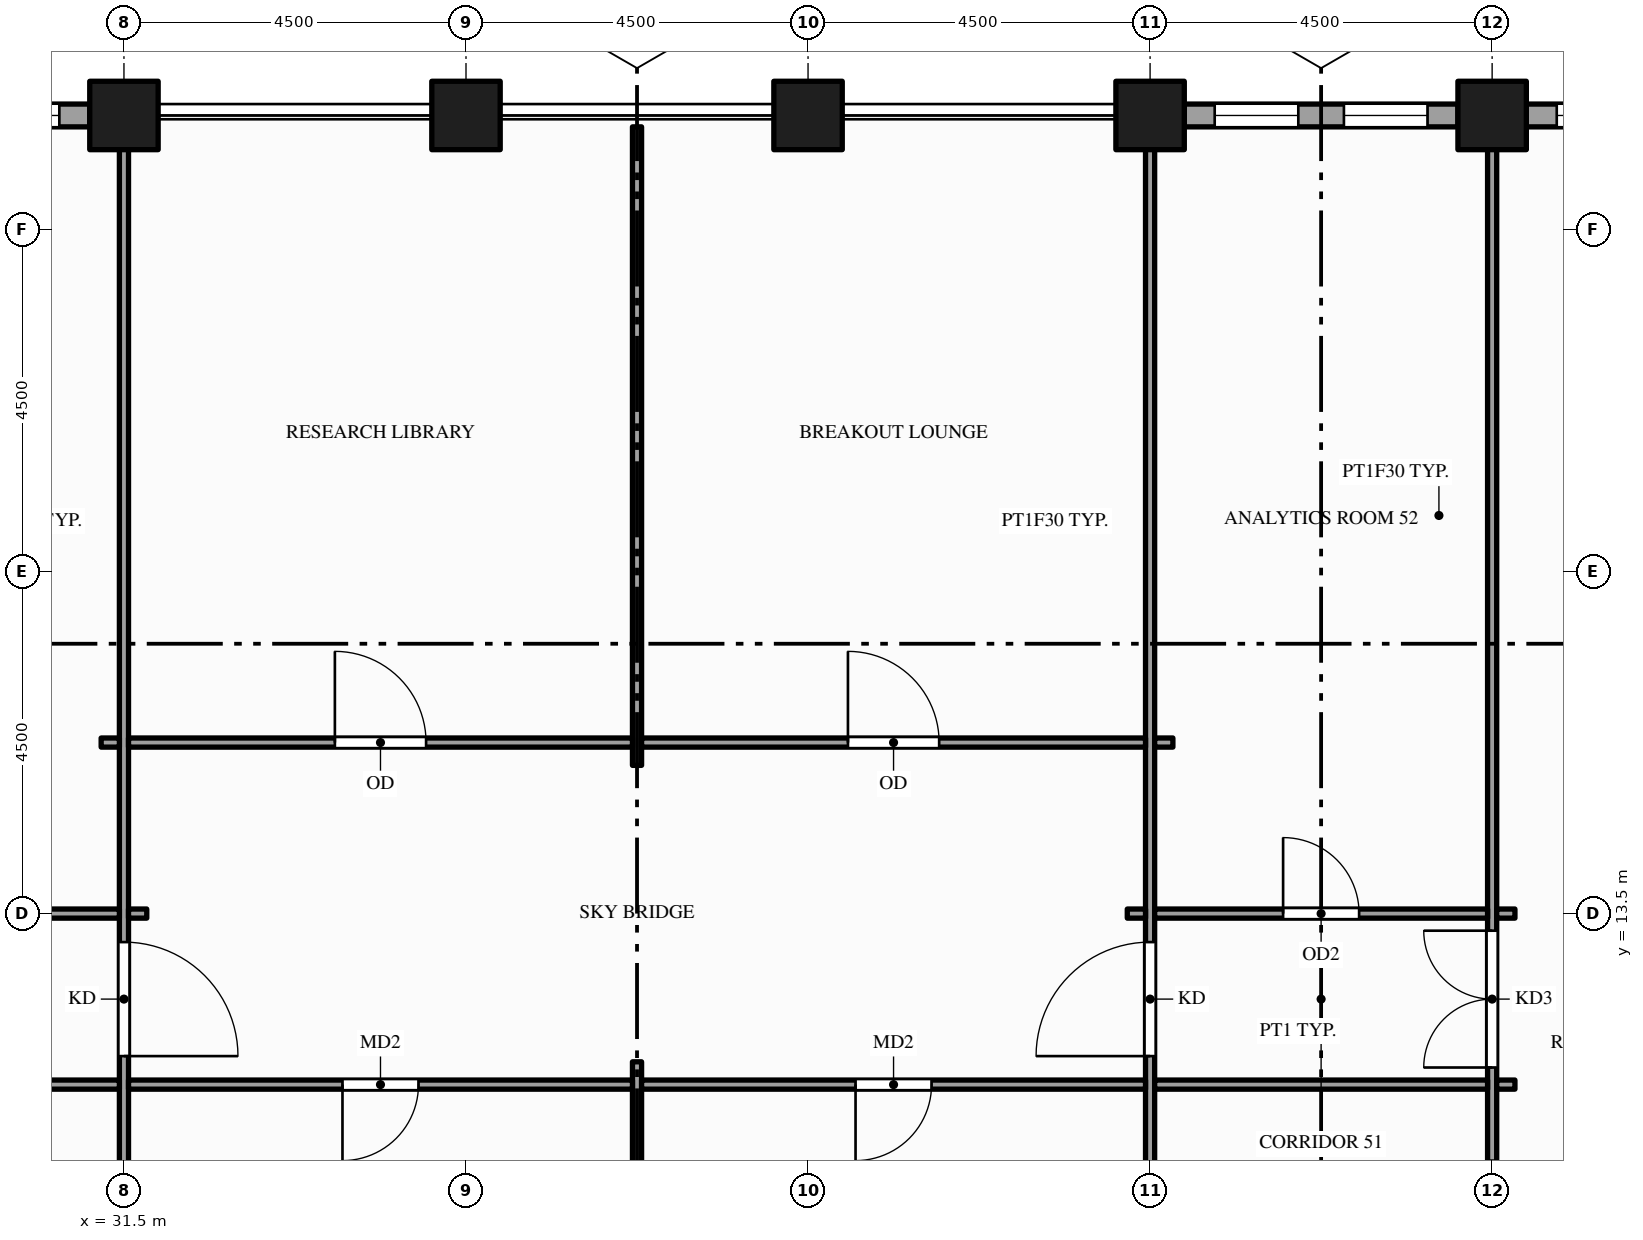
"""IFC4 building model, lengths in metres.
Left out: names, types, materials, properties, quantities, classifications, styles, units other than length and angle.
Written with IfcOpenShell. Run it as: python <this file> out.ifc"""

import sys

from ifc_helpers import new_model, si_unit, direction, frame, frame_2d, origin, origin_2d, place, context, subcontext, project, spatial, rectangle, hollow_rectangle, extrude, element, fill, save


model = new_model("IFC4")
c1 = context("Model", 3, precision=1e-05, world=origin(), true_north=direction((0.0, 1.0)))
c2 = subcontext(c1, "Body", "Model", "MODEL_VIEW")
j1 = project(units=[si_unit("LENGTHUNIT", "METRE"), si_unit("PLANEANGLEUNIT", "RADIAN")], contexts=[c1])
p1 = place(None, origin())
s1 = spatial("IfcSite", under=j1, at=p1, CompositionType="ELEMENT")
p2 = place(p1, origin())
s2 = spatial("IfcBuilding", under=s1, at=p2, CompositionType="ELEMENT")
p3 = place(p2, frame((0.0, 0.0, 155.0)))
s3 = spatial("IfcBuildingStorey", under=s2, at=p3, CompositionType="ELEMENT", Elevation=155.0)
for number, where, z_axis, x_axis in (
    (1, (31.5, 24.0, -0.15), (0.0, 0.0, 1.0), (1.0, 0.0, 0.0)),
    (2, (36.0, 24.0, -0.15), (0.0, 0.0, 1.0), (1.0, 0.0, 0.0)),
    (3, (40.5, 24.0, -0.15), (0.0, 0.0, 1.0), (1.0, 0.0, 0.0)),
    (4, (45.0, 24.0, -0.15), (0.0, 0.0, 1.0), (1.0, 0.0, 0.0)),
    (5, (49.5, 24.0, -0.15), (0.0, 0.0, 1.0), (1.0, 0.0, 0.0)),
):
    element("IfcColumn", number, at=place(p3, frame(where, z_axis=z_axis, x_axis=x_axis)), inside=s3, PredefinedType="COLUMN", context=c2, shape_type="SweptSolid", body=[
        extrude(hollow_rectangle(XDim=0.9, YDim=0.9, WallThickness=0.045, at=origin_2d()), origin(), (0.0, 0.0, 1.0), 4.0),
    ])
p4 = place(p3, frame((53.55, 24.0, 0.0), z_axis=(0.0, 0.0, 1.0), x_axis=(-1.0, 0.0, 0.0)))
e6 = element("IfcWall", 6, at=p4, inside=s3, PredefinedType="STANDARD", context=c2, shape_type="SweptSolid", body=[
    extrude(rectangle(XDim=3.6, YDim=0.3, at=frame_2d((1.8, 0.0))), origin(), (0.0, 0.0, 1.0), 2.87),
])
p5 = place(p4, frame((0.4, 0.0, 0.9)))
e7 = element("IfcOpeningElement", 7, at=p5, cuts=e6, PredefinedType="OPENING", context=c2, shape_type="SweptSolid", body=[
    extrude(rectangle(XDim=1.1, YDim=1.75, at=frame_2d((0.55, 0.875))), frame((0.0, 0.16, 0.0), z_axis=(0.0, -1.0, 0.0), x_axis=(1.0, 0.0, 0.0)), (0.0, 0.0, 1.0), 0.32),
])
p6 = place(p4, frame((2.1, 0.0, 0.9)))
e8 = element("IfcOpeningElement", 8, at=p6, cuts=e6, PredefinedType="OPENING", context=c2, shape_type="SweptSolid", body=[
    extrude(rectangle(XDim=1.1, YDim=1.75, at=frame_2d((0.55, 0.875))), frame((0.0, 0.16, 0.0), z_axis=(0.0, -1.0, 0.0), x_axis=(1.0, 0.0, 0.0)), (0.0, 0.0, 1.0), 0.32),
])
p7 = place(p3, frame((49.05, 24.0, 0.0), z_axis=(0.0, 0.0, 1.0), x_axis=(-1.0, 0.0, 0.0)))
e9 = element("IfcWall", 9, at=p7, inside=s3, PredefinedType="STANDARD", context=c2, shape_type="SweptSolid", body=[
    extrude(rectangle(XDim=3.6, YDim=0.3, at=frame_2d((1.8, 0.0))), origin(), (0.0, 0.0, 1.0), 2.87),
])
p8 = place(p7, frame((0.4, 0.0, 0.9)))
e10 = element("IfcOpeningElement", 10, at=p8, cuts=e9, PredefinedType="OPENING", context=c2, shape_type="SweptSolid", body=[
    extrude(rectangle(XDim=1.1, YDim=1.75, at=frame_2d((0.55, 0.875))), frame((0.0, 0.16, 0.0), z_axis=(0.0, -1.0, 0.0), x_axis=(1.0, 0.0, 0.0)), (0.0, 0.0, 1.0), 0.32),
])
p9 = place(p7, frame((2.1, 0.0, 0.9)))
e11 = element("IfcOpeningElement", 11, at=p9, cuts=e9, PredefinedType="OPENING", context=c2, shape_type="SweptSolid", body=[
    extrude(rectangle(XDim=1.1, YDim=1.75, at=frame_2d((0.55, 0.875))), frame((0.0, 0.16, 0.0), z_axis=(0.0, -1.0, 0.0), x_axis=(1.0, 0.0, 0.0)), (0.0, 0.0, 1.0), 0.32),
])
p10 = place(p3, frame((31.05, 24.0, 0.0), z_axis=(0.0, 0.0, 1.0), x_axis=(-1.0, 0.0, 0.0)))
e12 = element("IfcWall", 12, at=p10, inside=s3, PredefinedType="STANDARD", context=c2, shape_type="SweptSolid", body=[
    extrude(rectangle(XDim=5.1, YDim=0.3, at=frame_2d((2.55, 0.0))), origin(), (0.0, 0.0, 1.0), 2.87),
])
p11 = place(p10, frame((0.4, 0.0, 0.9)))
e13 = element("IfcOpeningElement", 13, at=p11, cuts=e12, PredefinedType="OPENING", context=c2, shape_type="SweptSolid", body=[
    extrude(rectangle(XDim=1.1, YDim=1.75, at=frame_2d((0.55, 0.875))), frame((0.0, 0.16, 0.0), z_axis=(0.0, -1.0, 0.0), x_axis=(1.0, 0.0, 0.0)), (0.0, 0.0, 1.0), 0.32),
])
p12 = place(p10, frame((2.1, 0.0, 0.9)))
e14 = element("IfcOpeningElement", 14, at=p12, cuts=e12, PredefinedType="OPENING", context=c2, shape_type="SweptSolid", body=[
    extrude(rectangle(XDim=1.65, YDim=1.75, at=frame_2d((0.825, 0.875))), frame((0.0, 0.16, 0.0), z_axis=(0.0, -1.0, 0.0), x_axis=(1.0, 0.0, 0.0)), (0.0, 0.0, 1.0), 0.32),
])
p13 = place(p3, frame((31.5, 1.65, 0.0), z_axis=(0.0, 0.0, 1.0), x_axis=(0.0, 1.0, 0.0)))
e15 = element("IfcWall", 15, at=p13, inside=s3, PredefinedType="PARTITIONING", context=c2, shape_type="SweptSolid", body=[
    extrude(rectangle(XDim=22.2, YDim=0.12, at=frame_2d((11.1, 0.0))), origin(), (0.0, 0.0, 1.0), 2.87),
])
p14 = place(p13, frame((9.975, 0.0, 0.0)))
e16 = element("IfcOpeningElement", 16, at=p14, cuts=e15, PredefinedType="OPENING", context=c2, shape_type="SweptSolid", body=[
    extrude(rectangle(XDim=1.5, YDim=2.1, at=frame_2d((0.75, 1.05))), frame((0.0, 0.07, 0.0), z_axis=(0.0, -1.0, 0.0), x_axis=(1.0, 0.0, 0.0)), (0.0, 0.0, 1.0), 0.14),
])
p15 = place(p3, frame((38.25, 1.65, 0.0), z_axis=(0.0, 0.0, 1.0), x_axis=(0.0, 1.0, 0.0)))
e17 = element("IfcWall", 17, at=p15, inside=s3, PredefinedType="PARTITIONING", context=c2, shape_type="SweptSolid", body=[
    extrude(rectangle(XDim=9.9, YDim=0.12, at=frame_2d((4.95, 0.0))), origin(), (0.0, 0.0, 1.0), 2.87),
])
p16 = place(p3, frame((38.25, 15.45, 0.0), z_axis=(0.0, 0.0, 1.0), x_axis=(0.0, 1.0, 0.0)))
e18 = element("IfcWall", 18, at=p16, inside=s3, PredefinedType="PARTITIONING", context=c2, shape_type="SweptSolid", body=[
    extrude(rectangle(XDim=8.4, YDim=0.12, at=frame_2d((4.2, 0.0))), origin(), (0.0, 0.0, 1.0), 2.87),
])
p17 = place(p3, frame((45.0, 1.65, 0.0), z_axis=(0.0, 0.0, 1.0), x_axis=(0.0, 1.0, 0.0)))
e19 = element("IfcWall", 19, at=p17, inside=s3, PredefinedType="PARTITIONING", context=c2, shape_type="SweptSolid", body=[
    extrude(rectangle(XDim=22.2, YDim=0.12, at=frame_2d((11.1, 0.0))), origin(), (0.0, 0.0, 1.0), 2.87),
])
p18 = place(p17, frame((9.975, 0.0, 0.0)))
e20 = element("IfcOpeningElement", 20, at=p18, cuts=e19, PredefinedType="OPENING", context=c2, shape_type="SweptSolid", body=[
    extrude(rectangle(XDim=1.5, YDim=2.1, at=frame_2d((0.75, 1.05))), frame((0.0, 0.07, 0.0), z_axis=(0.0, -1.0, 0.0), x_axis=(1.0, 0.0, 0.0)), (0.0, 0.0, 1.0), 0.14),
])
p19 = place(p3, frame((49.5, 1.65, 0.0), z_axis=(0.0, 0.0, 1.0), x_axis=(0.0, 1.0, 0.0)))
e21 = element("IfcWall", 21, at=p19, inside=s3, PredefinedType="PARTITIONING", context=c2, shape_type="SweptSolid", body=[
    extrude(rectangle(XDim=22.2, YDim=0.12, at=frame_2d((11.1, 0.0))), origin(), (0.0, 0.0, 1.0), 2.87),
])
p20 = place(p19, frame((9.825, 0.0, 0.0)))
e22 = element("IfcOpeningElement", 22, at=p20, cuts=e21, PredefinedType="OPENING", context=c2, shape_type="SweptSolid", body=[
    extrude(rectangle(XDim=1.8, YDim=2.1, at=frame_2d((0.9, 1.05))), frame((0.0, 0.07, 0.0), z_axis=(0.0, -1.0, 0.0), x_axis=(1.0, 0.0, 0.0)), (0.0, 0.0, 1.0), 0.14),
])
p21 = place(p19, frame((0.85, 0.0, 0.0)))
e23 = element("IfcOpeningElement", 23, at=p21, cuts=e21, PredefinedType="OPENING", context=c2, shape_type="SweptSolid", body=[
    extrude(rectangle(XDim=0.9, YDim=2.1, at=frame_2d((0.45, 1.05))), frame((0.0, 0.07, 0.0), z_axis=(0.0, -1.0, 0.0), x_axis=(1.0, 0.0, 0.0)), (0.0, 0.0, 1.0), 0.14),
])
p22 = place(p19, frame((4.275, 0.0, 0.0)))
e24 = element("IfcOpeningElement", 24, at=p22, cuts=e21, PredefinedType="OPENING", context=c2, shape_type="SweptSolid", body=[
    extrude(rectangle(XDim=0.9, YDim=2.1, at=frame_2d((0.45, 1.05))), frame((0.0, 0.07, 0.0), z_axis=(0.0, -1.0, 0.0), x_axis=(1.0, 0.0, 0.0)), (0.0, 0.0, 1.0), 0.14),
])
p23 = place(p19, frame((7.6, 0.0, 0.0)))
e25 = element("IfcOpeningElement", 25, at=p23, cuts=e21, PredefinedType="OPENING", context=c2, shape_type="SweptSolid", body=[
    extrude(rectangle(XDim=1.0, YDim=2.1, at=frame_2d((0.5, 1.05))), frame((0.0, 0.07, 0.0), z_axis=(0.0, -1.0, 0.0), x_axis=(1.0, 0.0, 0.0)), (0.0, 0.0, 1.0), 0.14),
])
p24 = place(p3, frame((27.06, 11.25, 0.0), z_axis=(0.0, 0.0, 1.0), x_axis=(1.0, 0.0, 0.0)))
e26 = element("IfcWall", 26, at=p24, inside=s3, PredefinedType="PARTITIONING", context=c2, shape_type="SweptSolid", body=[
    extrude(rectangle(XDim=4.38, YDim=0.12, at=frame_2d((2.19, 0.0))), origin(), (0.0, 0.0, 1.0), 2.87),
])
p25 = place(p24, frame((1.74, 0.0, 0.0)))
e27 = element("IfcOpeningElement", 27, at=p25, cuts=e26, PredefinedType="OPENING", context=c2, shape_type="SweptSolid", body=[
    extrude(rectangle(XDim=0.9, YDim=2.1, at=frame_2d((0.45, 1.05))), frame((0.0, 0.07, 0.0), z_axis=(0.0, -1.0, 0.0), x_axis=(1.0, 0.0, 0.0)), (0.0, 0.0, 1.0), 0.14),
])
p26 = place(p3, frame((31.56, 11.25, 0.0), z_axis=(0.0, 0.0, 1.0), x_axis=(1.0, 0.0, 0.0)))
e28 = element("IfcWall", 28, at=p26, inside=s3, PredefinedType="PARTITIONING", context=c2, shape_type="SweptSolid", body=[
    extrude(rectangle(XDim=6.63, YDim=0.12, at=frame_2d((3.315, 0.0))), origin(), (0.0, 0.0, 1.0), 2.87),
])
p27 = place(p26, frame((2.815, 0.0, 0.0)))
e29 = element("IfcOpeningElement", 29, at=p27, cuts=e28, PredefinedType="OPENING", context=c2, shape_type="SweptSolid", body=[
    extrude(rectangle(XDim=1.0, YDim=2.1, at=frame_2d((0.5, 1.05))), frame((0.0, 0.07, 0.0), z_axis=(0.0, -1.0, 0.0), x_axis=(1.0, 0.0, 0.0)), (0.0, 0.0, 1.0), 0.14),
])
p28 = place(p3, frame((38.31, 11.25, 0.0), z_axis=(0.0, 0.0, 1.0), x_axis=(1.0, 0.0, 0.0)))
e30 = element("IfcWall", 30, at=p28, inside=s3, PredefinedType="PARTITIONING", context=c2, shape_type="SweptSolid", body=[
    extrude(rectangle(XDim=6.63, YDim=0.12, at=frame_2d((3.315, 0.0))), origin(), (0.0, 0.0, 1.0), 2.87),
])
p29 = place(p28, frame((2.815, 0.0, 0.0)))
e31 = element("IfcOpeningElement", 31, at=p29, cuts=e30, PredefinedType="OPENING", context=c2, shape_type="SweptSolid", body=[
    extrude(rectangle(XDim=1.0, YDim=2.1, at=frame_2d((0.5, 1.05))), frame((0.0, 0.07, 0.0), z_axis=(0.0, -1.0, 0.0), x_axis=(1.0, 0.0, 0.0)), (0.0, 0.0, 1.0), 0.14),
])
p30 = place(p3, frame((45.06, 11.25, 0.0), z_axis=(0.0, 0.0, 1.0), x_axis=(1.0, 0.0, 0.0)))
e32 = element("IfcWall", 32, at=p30, inside=s3, PredefinedType="PARTITIONING", context=c2, shape_type="SweptSolid", body=[
    extrude(rectangle(XDim=4.38, YDim=0.12, at=frame_2d((2.19, 0.0))), origin(), (0.0, 0.0, 1.0), 2.87),
])
p31 = place(p3, frame((49.56, 11.25, 0.0), z_axis=(0.0, 0.0, 1.0), x_axis=(1.0, 0.0, 0.0)))
e33 = element("IfcWall", 33, at=p31, inside=s3, PredefinedType="PARTITIONING", context=c2, shape_type="SweptSolid", body=[
    extrude(rectangle(XDim=0.24, YDim=0.12, at=frame_2d((0.12, 0.0))), origin(), (0.0, 0.0, 1.0), 2.87),
])
p32 = place(p3, frame((11.31, 13.5, 0.0), z_axis=(0.0, 0.0, 1.0), x_axis=(1.0, 0.0, 0.0)))
e34 = element("IfcWall", 34, at=p32, inside=s3, PredefinedType="PARTITIONING", context=c2, shape_type="SweptSolid", body=[
    extrude(rectangle(XDim=20.13, YDim=0.12, at=frame_2d((10.065, 0.0))), origin(), (0.0, 0.0, 1.0), 2.87),
])
p33 = place(p32, frame((9.165, 0.0, 0.0)))
e35 = element("IfcOpeningElement", 35, at=p33, cuts=e34, PredefinedType="OPENING", context=c2, shape_type="SweptSolid", body=[
    extrude(rectangle(XDim=1.8, YDim=2.1, at=frame_2d((0.9, 1.05))), frame((0.0, 0.07, 0.0), z_axis=(0.0, -1.0, 0.0), x_axis=(1.0, 0.0, 0.0)), (0.0, 0.0, 1.0), 0.14),
])
for number, where, z_axis, x_axis in (
    (36, (31.56, 13.5, 0.0), (0.0, 0.0, 1.0), (1.0, 0.0, 0.0)),
    (37, (44.7, 13.5, 0.0), (0.0, 0.0, 1.0), (1.0, 0.0, 0.0)),
):
    element("IfcWall", number, at=place(p3, frame(where, z_axis=z_axis, x_axis=x_axis)), inside=s3, PredefinedType="PARTITIONING", context=c2, shape_type="SweptSolid", body=[
        extrude(rectangle(XDim=0.24, YDim=0.12, at=frame_2d((0.12, 0.0))), origin(), (0.0, 0.0, 1.0), 2.87),
    ])
p34 = place(p3, frame((45.06, 13.5, 0.0), z_axis=(0.0, 0.0, 1.0), x_axis=(1.0, 0.0, 0.0)))
e38 = element("IfcWall", 38, at=p34, inside=s3, PredefinedType="PARTITIONING", context=c2, shape_type="SweptSolid", body=[
    extrude(rectangle(XDim=4.38, YDim=0.12, at=frame_2d((2.19, 0.0))), origin(), (0.0, 0.0, 1.0), 2.87),
])
p35 = place(p34, frame((1.69, 0.0, 0.0)))
e39 = element("IfcOpeningElement", 39, at=p35, cuts=e38, PredefinedType="OPENING", context=c2, shape_type="SweptSolid", body=[
    extrude(rectangle(XDim=1.0, YDim=2.1, at=frame_2d((0.5, 1.05))), frame((0.0, 0.07, 0.0), z_axis=(0.0, -1.0, 0.0), x_axis=(1.0, 0.0, 0.0)), (0.0, 0.0, 1.0), 0.14),
])
for number, where, z_axis, x_axis in (
    (40, (49.56, 13.5, 0.0), (0.0, 0.0, 1.0), (1.0, 0.0, 0.0)),
    (41, (31.2, 15.75, 0.0), (0.0, 0.0, 1.0), (1.0, 0.0, 0.0)),
):
    element("IfcWall", number, at=place(p3, frame(where, z_axis=z_axis, x_axis=x_axis)), inside=s3, PredefinedType="PARTITIONING", context=c2, shape_type="SweptSolid", body=[
        extrude(rectangle(XDim=0.24, YDim=0.12, at=frame_2d((0.12, 0.0))), origin(), (0.0, 0.0, 1.0), 2.87),
    ])
p36 = place(p3, frame((31.56, 15.75, 0.0), z_axis=(0.0, 0.0, 1.0), x_axis=(1.0, 0.0, 0.0)))
e42 = element("IfcWall", 42, at=p36, inside=s3, PredefinedType="PARTITIONING", context=c2, shape_type="SweptSolid", body=[
    extrude(rectangle(XDim=6.63, YDim=0.12, at=frame_2d((3.315, 0.0))), origin(), (0.0, 0.0, 1.0), 2.87),
])
p37 = place(p36, frame((2.715, 0.0, 0.0)))
e43 = element("IfcOpeningElement", 43, at=p37, cuts=e42, PredefinedType="OPENING", context=c2, shape_type="SweptSolid", body=[
    extrude(rectangle(XDim=1.2, YDim=2.1, at=frame_2d((0.6, 1.05))), frame((0.0, 0.07, 0.0), z_axis=(0.0, -1.0, 0.0), x_axis=(1.0, 0.0, 0.0)), (0.0, 0.0, 1.0), 0.14),
])
p38 = place(p3, frame((38.31, 15.75, 0.0), z_axis=(0.0, 0.0, 1.0), x_axis=(1.0, 0.0, 0.0)))
e44 = element("IfcWall", 44, at=p38, inside=s3, PredefinedType="PARTITIONING", context=c2, shape_type="SweptSolid", body=[
    extrude(rectangle(XDim=6.63, YDim=0.12, at=frame_2d((3.315, 0.0))), origin(), (0.0, 0.0, 1.0), 2.87),
])
p39 = place(p38, frame((2.715, 0.0, 0.0)))
e45 = element("IfcOpeningElement", 45, at=p39, cuts=e44, PredefinedType="OPENING", context=c2, shape_type="SweptSolid", body=[
    extrude(rectangle(XDim=1.2, YDim=2.1, at=frame_2d((0.6, 1.05))), frame((0.0, 0.07, 0.0), z_axis=(0.0, -1.0, 0.0), x_axis=(1.0, 0.0, 0.0)), (0.0, 0.0, 1.0), 0.14),
])
p40 = place(p3, frame((45.06, 15.75, 0.0), z_axis=(0.0, 0.0, 1.0), x_axis=(1.0, 0.0, 0.0)))
e46 = element("IfcWall", 46, at=p40, inside=s3, PredefinedType="PARTITIONING", context=c2, shape_type="SweptSolid", body=[
    extrude(rectangle(XDim=0.24, YDim=0.12, at=frame_2d((0.12, 0.0))), origin(), (0.0, 0.0, 1.0), 2.87),
])
p41 = place(p6, origin())
e47 = element("IfcWindow", 47, at=p41, inside=s3, PartitioningType="SINGLE_PANEL", PredefinedType="WINDOW", context=c2, shape_type="SweptSolid", body=[
    extrude(rectangle(XDim=1.1, YDim=1.75, at=frame_2d((0.55, 0.875))), frame((0.0, 0.03, 0.0), z_axis=(0.0, -1.0, 0.0), x_axis=(1.0, 0.0, 0.0)), (0.0, 0.0, 1.0), 0.06),
])
fill(e8, e47)
p42 = place(p8, origin())
e48 = element("IfcWindow", 48, at=p42, inside=s3, PartitioningType="SINGLE_PANEL", PredefinedType="WINDOW", context=c2, shape_type="SweptSolid", body=[
    extrude(rectangle(XDim=1.1, YDim=1.75, at=frame_2d((0.55, 0.875))), frame((0.0, 0.03, 0.0), z_axis=(0.0, -1.0, 0.0), x_axis=(1.0, 0.0, 0.0)), (0.0, 0.0, 1.0), 0.06),
])
fill(e10, e48)
p43 = place(p9, origin())
e49 = element("IfcWindow", 49, at=p43, inside=s3, PartitioningType="SINGLE_PANEL", PredefinedType="WINDOW", context=c2, shape_type="SweptSolid", body=[
    extrude(rectangle(XDim=1.1, YDim=1.75, at=frame_2d((0.55, 0.875))), frame((0.0, 0.03, 0.0), z_axis=(0.0, -1.0, 0.0), x_axis=(1.0, 0.0, 0.0)), (0.0, 0.0, 1.0), 0.06),
])
fill(e11, e49)
p44 = place(p11, origin())
e50 = element("IfcWindow", 50, at=p44, inside=s3, PartitioningType="SINGLE_PANEL", PredefinedType="WINDOW", context=c2, shape_type="SweptSolid", body=[
    extrude(rectangle(XDim=1.1, YDim=1.75, at=frame_2d((0.55, 0.875))), frame((0.0, 0.03, 0.0), z_axis=(0.0, -1.0, 0.0), x_axis=(1.0, 0.0, 0.0)), (0.0, 0.0, 1.0), 0.06),
])
fill(e13, e50)
p45 = place(p14, origin())
e51 = element("IfcDoor", 51, at=p45, inside=s3, OperationType="SINGLE_SWING_LEFT", PredefinedType="DOOR", context=c2, shape_type="SweptSolid", body=[
    extrude(rectangle(XDim=1.5, YDim=2.1, at=frame_2d((0.75, 1.05))), frame((0.0, 0.025, 0.0), z_axis=(0.0, -1.0, 0.0), x_axis=(1.0, 0.0, 0.0)), (0.0, 0.0, 1.0), 0.05),
])
fill(e16, e51)
p46 = place(p18, origin())
e52 = element("IfcDoor", 52, at=p46, inside=s3, OperationType="SINGLE_SWING_LEFT", PredefinedType="DOOR", context=c2, shape_type="SweptSolid", body=[
    extrude(rectangle(XDim=1.5, YDim=2.1, at=frame_2d((0.75, 1.05))), frame((0.0, 0.025, 0.0), z_axis=(0.0, -1.0, 0.0), x_axis=(1.0, 0.0, 0.0)), (0.0, 0.0, 1.0), 0.05),
])
fill(e20, e52)
p47 = place(p20, origin())
e53 = element("IfcDoor", 53, at=p47, inside=s3, OperationType="DOUBLE_DOOR_SINGLE_SWING", PredefinedType="DOOR", context=c2, shape_type="SweptSolid", body=[
    extrude(rectangle(XDim=1.8, YDim=2.1, at=frame_2d((0.9, 1.05))), frame((0.0, 0.025, 0.0), z_axis=(0.0, -1.0, 0.0), x_axis=(1.0, 0.0, 0.0)), (0.0, 0.0, 1.0), 0.05),
])
fill(e22, e53)
p48 = place(p27, origin())
e54 = element("IfcDoor", 54, at=p48, inside=s3, OperationType="SINGLE_SWING_LEFT", PredefinedType="DOOR", context=c2, shape_type="SweptSolid", body=[
    extrude(rectangle(XDim=1.0, YDim=2.1, at=frame_2d((0.5, 1.05))), frame((0.0, 0.025, 0.0), z_axis=(0.0, -1.0, 0.0), x_axis=(1.0, 0.0, 0.0)), (0.0, 0.0, 1.0), 0.05),
])
fill(e29, e54)
p49 = place(p29, origin())
e55 = element("IfcDoor", 55, at=p49, inside=s3, OperationType="SINGLE_SWING_LEFT", PredefinedType="DOOR", context=c2, shape_type="SweptSolid", body=[
    extrude(rectangle(XDim=1.0, YDim=2.1, at=frame_2d((0.5, 1.05))), frame((0.0, 0.025, 0.0), z_axis=(0.0, -1.0, 0.0), x_axis=(1.0, 0.0, 0.0)), (0.0, 0.0, 1.0), 0.05),
])
fill(e31, e55)
p50 = place(p37, origin())
e56 = element("IfcDoor", 56, at=p50, inside=s3, OperationType="SINGLE_SWING_LEFT", PredefinedType="DOOR", context=c2, shape_type="SweptSolid", body=[
    extrude(rectangle(XDim=1.2, YDim=2.1, at=frame_2d((0.6, 1.05))), frame((0.0, 0.025, 0.0), z_axis=(0.0, -1.0, 0.0), x_axis=(1.0, 0.0, 0.0)), (0.0, 0.0, 1.0), 0.05),
])
fill(e43, e56)
p51 = place(p39, origin())
e57 = element("IfcDoor", 57, at=p51, inside=s3, OperationType="SINGLE_SWING_LEFT", PredefinedType="DOOR", context=c2, shape_type="SweptSolid", body=[
    extrude(rectangle(XDim=1.2, YDim=2.1, at=frame_2d((0.6, 1.05))), frame((0.0, 0.025, 0.0), z_axis=(0.0, -1.0, 0.0), x_axis=(1.0, 0.0, 0.0)), (0.0, 0.0, 1.0), 0.05),
])
fill(e45, e57)
p52 = place(p35, origin())
e58 = element("IfcDoor", 58, at=p52, inside=s3, OperationType="SINGLE_SWING_LEFT", PredefinedType="DOOR", context=c2, shape_type="SweptSolid", body=[
    extrude(rectangle(XDim=1.0, YDim=2.1, at=frame_2d((0.5, 1.05))), frame((0.0, 0.025, 0.0), z_axis=(0.0, -1.0, 0.0), x_axis=(1.0, 0.0, 0.0)), (0.0, 0.0, 1.0), 0.05),
])
fill(e39, e58)
save(model, sys.argv[1])
